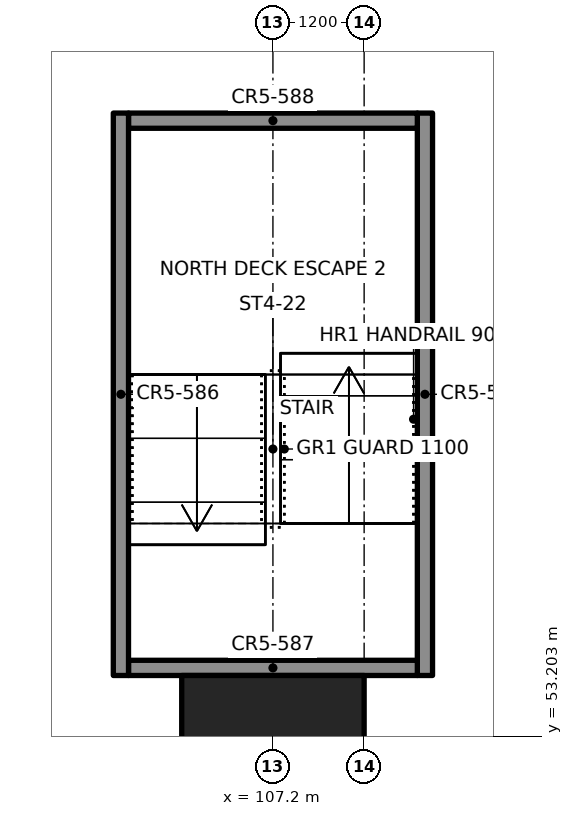
"""IFC4 building model, lengths in metres.
Left out: names, types, materials, properties, quantities, classifications, styles, units other than length and angle.
Written with IfcOpenShell. Run it as: python <this file> out.ifc"""

import sys

from ifc_helpers import new_model, si_unit, direction, frame, frame_2d, origin, origin_2d, place, context, subcontext, project, spatial, rectangle, extrude, element, save


model = new_model("IFC4")
c1 = context("Model", 3, precision=1e-05, world=origin(), true_north=direction((0.0, 1.0)))
c2 = subcontext(c1, "Body", "Model", "MODEL_VIEW")
j1 = project(units=[si_unit("LENGTHUNIT", "METRE"), si_unit("PLANEANGLEUNIT", "RADIAN")], contexts=[c1])
p1 = place(None, origin())
s1 = spatial("IfcSite", under=j1, at=p1, CompositionType="ELEMENT")
p2 = place(p1, origin())
s2 = spatial("IfcBuilding", under=s1, at=p2, CompositionType="ELEMENT")
p3 = place(p2, frame((0.0, 0.0, 8.8)))
s3 = spatial("IfcBuildingStorey", under=s2, at=p3, CompositionType="ELEMENT", Elevation=8.8)
p4 = place(p3, frame((107.2, 52.8, 0.0), z_axis=(0.0, 0.0, 1.0), x_axis=(1.0, 0.0, 0.0)))
e1 = element("IfcColumn", 1, at=p4, inside=s3, PredefinedType="COLUMN", context=c2, shape_type="SweptSolid", body=[
    extrude(rectangle(XDim=2.4, YDim=2.4, at=origin_2d()), origin(), (0.0, 0.0, 1.0), 3.65),
])
for number, where, z_axis, x_axis in (
    (2, (105.2, 54.0, 0.0), (0.0, 0.0, 1.0), (0.0, 1.0, 0.0)),
    (3, (109.2, 61.4, 0.0), (0.0, 0.0, 1.0), (0.0, -1.0, 0.0)),
):
    element("IfcWall", number, at=place(p3, frame(where, z_axis=z_axis, x_axis=x_axis)), inside=s3, PredefinedType="SOLIDWALL", context=c2, shape_type="SweptSolid", body=[
        extrude(rectangle(XDim=7.4, YDim=0.2, at=frame_2d((3.7, 0.0))), origin(), (0.0, 0.0, 1.0), 5.2),
    ])
for number, where, z_axis, x_axis in (
    (4, (105.3, 54.1, 0.0), (0.0, 0.0, 1.0), (1.0, 0.0, 0.0)),
    (5, (105.3, 61.3, 0.0), (0.0, 0.0, 1.0), (1.0, 0.0, 0.0)),
):
    element("IfcWall", number, at=place(p3, frame(where, z_axis=z_axis, x_axis=x_axis)), inside=s3, PredefinedType="SOLIDWALL", context=c2, shape_type="SweptSolid", body=[
        extrude(rectangle(XDim=3.8, YDim=0.2, at=frame_2d((1.9, 0.0))), origin(), (0.0, 0.0, 1.0), 5.2),
    ])
save(model, sys.argv[1])
